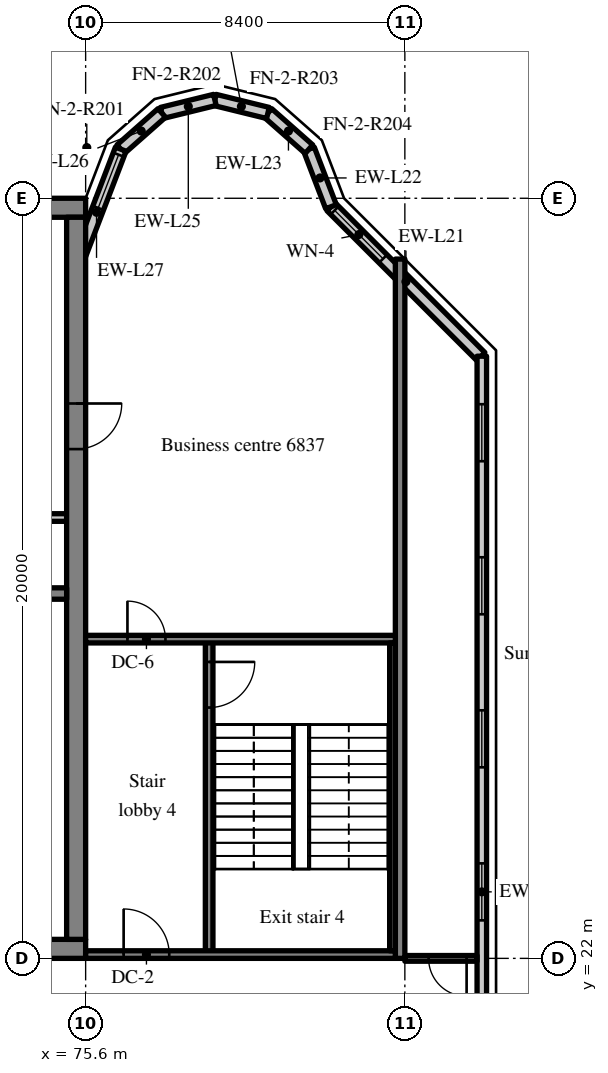
"""IFC4 building model, lengths in metres.
Left out: names, types, materials, properties, quantities, classifications, styles, units other than length and angle.
Written with IfcOpenShell. Run it as: python <this file> out.ifc"""

import sys

from ifc_helpers import new_model, si_unit, direction, frame, frame_2d, origin, place, context, subcontext, project, spatial, rectangle, extrude, source, transform, mapped, element, fill, save


model = new_model("IFC4")
c1 = context("Model", 3, precision=1e-05, world=origin(), true_north=direction((0.0, 1.0)))
c2 = subcontext(c1, "Body", "Model", "MODEL_VIEW")
j1 = project(units=[si_unit("LENGTHUNIT", "METRE"), si_unit("PLANEANGLEUNIT", "RADIAN")], contexts=[c1])
p1 = place(None, origin())
s1 = spatial("IfcSite", under=j1, at=p1, CompositionType="ELEMENT")
p2 = place(p1, origin())
s2 = spatial("IfcBuilding", under=s1, at=p2, CompositionType="ELEMENT")
p3 = place(p2, frame((0.0, 0.0, 285.7)))
s3 = spatial("IfcBuildingStorey", under=s2, at=p3, CompositionType="ELEMENT", Elevation=285.7)
m1 = source(origin(), c2, "Body", "SweptSolid", [
    extrude(rectangle(XDim=50.4, YDim=0.5, at=frame_2d((25.2, 0.0))), origin(), (0.0, 0.0, 1.0), 3.72),
])
p4 = place(p3, frame((25.2, 22.25, 0.0), z_axis=(0.0, 0.0, 1.0), x_axis=(1.0, 0.0, 0.0)))
e1 = element("IfcWall", 1, at=p4, inside=s3, PredefinedType="SHEAR", context=c2, shape_type="MappedRepresentation", body=[
    mapped(m1, transform((0.0, 0.0, 0.0), scale=1.0)),
])
m2 = source(origin(), c2, "Body", "SweptSolid", [
    extrude(rectangle(XDim=1.8, YDim=2.1, at=frame_2d((0.9, 1.05))), frame((0.0, 0.26, 0.0), z_axis=(0.0, -1.0, 0.0), x_axis=(1.0, 0.0, 0.0)), (0.0, 0.0, 1.0), 0.52),
])
p5 = place(p4, frame((15.9, 0.0, 0.0)))
e2 = element("IfcOpeningElement", 2, at=p5, cuts=e1, PredefinedType="OPENING", context=c2, shape_type="MappedRepresentation", body=[
    mapped(m2, transform((0.0, 0.0, 0.0), scale=1.0)),
])
m3 = source(origin(), c2, "Body", "SweptSolid", [
    extrude(rectangle(XDim=0.9, YDim=2.1, at=frame_2d((0.45, 1.05))), frame((0.0, 0.26, 0.0), z_axis=(0.0, -1.0, 0.0), x_axis=(1.0, 0.0, 0.0)), (0.0, 0.0, 1.0), 0.52),
])
p6 = place(p4, frame((21.525, 0.0, 0.0)))
e3 = element("IfcOpeningElement", 3, at=p6, cuts=e1, PredefinedType="OPENING", context=c2, shape_type="MappedRepresentation", body=[
    mapped(m3, transform((0.0, 0.0, 0.0), scale=1.0)),
])
p7 = place(p4, frame((32.7, 0.0, 0.0)))
e4 = element("IfcOpeningElement", 4, at=p7, cuts=e1, PredefinedType="OPENING", context=c2, shape_type="MappedRepresentation", body=[
    mapped(m2, transform((0.0, 0.0, 0.0), scale=1.0)),
])
m4 = source(origin(), c2, "Body", "SweptSolid", [
    extrude(rectangle(XDim=1.2, YDim=2.1, at=frame_2d((0.6, 1.05))), frame((0.0, 0.26, 0.0), z_axis=(0.0, -1.0, 0.0), x_axis=(1.0, 0.0, 0.0)), (0.0, 0.0, 1.0), 0.52),
])
p8 = place(p4, frame((6.5, 0.0, 0.0)))
e5 = element("IfcOpeningElement", 5, at=p8, cuts=e1, PredefinedType="OPENING", context=c2, shape_type="MappedRepresentation", body=[
    mapped(m4, transform((0.0, 0.0, 0.0), scale=1.0)),
])
p9 = place(p4, frame((47.975, 0.0, 0.0)))
e6 = element("IfcOpeningElement", 6, at=p9, cuts=e1, PredefinedType="OPENING", context=c2, shape_type="MappedRepresentation", body=[
    mapped(m4, transform((0.0, 0.0, 0.0), scale=1.0)),
])
p10 = place(p3, frame((25.2, 41.75, 0.0), z_axis=(0.0, 0.0, 1.0), x_axis=(1.0, 0.0, 0.0)))
e7 = element("IfcWall", 7, at=p10, inside=s3, PredefinedType="SHEAR", context=c2, shape_type="MappedRepresentation", body=[
    mapped(m1, transform((0.0, 0.0, 0.0), scale=1.0)),
])
m5 = source(origin(), c2, "Body", "SweptSolid", [
    extrude(rectangle(XDim=19.0, YDim=0.5, at=frame_2d((9.5, 0.0))), origin(), (0.0, 0.0, 1.0), 3.72),
])
p11 = place(p3, frame((75.35, 22.5, 0.0), z_axis=(0.0, 0.0, 1.0), x_axis=(0.0, 1.0, 0.0)))
e8 = element("IfcWall", 8, at=p11, inside=s3, PredefinedType="SHEAR", context=c2, shape_type="MappedRepresentation", body=[
    mapped(m5, transform((0.0, 0.0, 0.0), scale=1.0)),
])
p12 = place(p11, frame((12.9, 0.0, 0.0)))
e9 = element("IfcOpeningElement", 9, at=p12, cuts=e8, PredefinedType="OPENING", context=c2, shape_type="MappedRepresentation", body=[
    mapped(m4, transform((0.0, 0.0, 0.0), scale=1.0)),
])
m6 = source(origin(), c2, "Body", "SweptSolid", [
    extrude(rectangle(XDim=7.75, YDim=0.3, at=frame_2d((3.875, 0.0))), origin(), (0.0, 0.0, 1.0), 3.72),
])
p13 = place(p3, frame((67.35, 31.6, 0.0), z_axis=(0.0, 0.0, 1.0), x_axis=(1.0, 0.0, 0.0)))
e10 = element("IfcWall", 10, at=p13, inside=s3, PredefinedType="SHEAR", context=c2, shape_type="MappedRepresentation", body=[
    mapped(m6, transform((0.0, 0.0, 0.0), scale=1.0)),
])
m7 = source(origin(), c2, "Body", "SweptSolid", [
    extrude(rectangle(XDim=1.1, YDim=2.1, at=frame_2d((0.55, 1.05))), frame((0.0, 0.16, 0.0), z_axis=(0.0, -1.0, 0.0), x_axis=(1.0, 0.0, 0.0)), (0.0, 0.0, 1.0), 0.32),
])
p14 = place(p13, frame((5.875, 0.0, 0.0)))
e11 = element("IfcOpeningElement", 11, at=p14, cuts=e10, PredefinedType="OPENING", context=c2, shape_type="MappedRepresentation", body=[
    mapped(m7, transform((0.0, 0.0, 0.0), scale=1.0)),
])
m8 = source(origin(), c2, "Body", "SweptSolid", [
    extrude(rectangle(XDim=18.4, YDim=0.25, at=frame_2d((9.2, 0.0))), origin(), (0.0, 0.0, 1.0), 3.72),
])
p15 = place(p3, frame((83.875, 22.0, 0.0), z_axis=(0.0, 0.0, 1.0), x_axis=(0.0, 1.0, 0.0)))
e12 = element("IfcWall", 12, at=p15, inside=s3, PredefinedType="SHEAR", context=c2, shape_type="MappedRepresentation", body=[
    mapped(m8, transform((0.0, 0.0, 0.0), scale=1.0)),
])
m9 = source(origin(), c2, "Body", "SweptSolid", [
    extrude(rectangle(XDim=5.576, YDim=0.3, at=frame_2d((2.788, 0.0))), origin(), (0.0, 0.0, 1.0), 3.72),
])
p16 = place(p3, frame((86.0, 37.834, 0.0), z_axis=(0.0, 0.0, 1.0), x_axis=(-0.707106781187, 0.707106781187, 0.0)))
e13 = element("IfcWall", 13, at=p16, inside=s3, PredefinedType="SOLIDWALL", context=c2, shape_type="MappedRepresentation", body=[
    mapped(m9, transform((0.0, 0.0, 0.0), scale=1.0)),
])
m10 = source(origin(), c2, "Body", "SweptSolid", [
    extrude(rectangle(XDim=1.8, YDim=1.5, at=frame_2d((0.9, 0.75))), frame((0.0, 0.16, 0.0), z_axis=(0.0, -1.0, 0.0), x_axis=(1.0, 0.0, 0.0)), (0.0, 0.0, 1.0), 0.32),
])
p17 = place(p16, frame((3.641, 0.0, 0.9)))
e14 = element("IfcOpeningElement", 14, at=p17, cuts=e13, PredefinedType="OPENING", context=c2, shape_type="MappedRepresentation", body=[
    mapped(m10, transform((0.0, 0.0, 0.0), scale=1.0)),
])
m11 = source(origin(), c2, "Body", "SweptSolid", [
    extrude(rectangle(XDim=1.622, YDim=0.3, at=frame_2d((0.811, 0.0))), origin(), (0.0, 0.0, 1.0), 3.72),
])
p18 = place(p3, frame((82.057, 41.777, 0.0), z_axis=(0.0, 0.0, 1.0), x_axis=(-0.357778527068, 0.933806471154, 0.0)))
e15 = element("IfcWall", 15, at=p18, inside=s3, PredefinedType="SOLIDWALL", context=c2, shape_type="MappedRepresentation", body=[
    mapped(m11, transform((0.0, 0.0, 0.0), scale=1.0)),
])
m12 = source(origin(), c2, "Body", "SweptSolid", [
    extrude(rectangle(XDim=1.44, YDim=0.3, at=frame_2d((0.72, 0.0))), origin(), (0.0, 0.0, 1.0), 3.72),
])
p19 = place(p3, frame((81.477, 43.292, 0.0), z_axis=(0.0, 0.0, 1.0), x_axis=(-0.74957555648, 0.661918790432, 0.0)))
e16 = element("IfcWall", 16, at=p19, inside=s3, PredefinedType="SOLIDWALL", context=c2, shape_type="MappedRepresentation", body=[
    mapped(m12, transform((0.0, 0.0, 0.0), scale=1.0)),
])
m13 = source(origin(), c2, "Body", "SweptSolid", [
    extrude(rectangle(XDim=1.439, YDim=0.3, at=frame_2d((0.719, 0.0))), origin(), (0.0, 0.0, 1.0), 3.72),
])
for number, where, z_axis, x_axis in (
    (17, (80.397, 44.245, 0.0), (0.0, 0.0, 1.0), (-0.971, 0.238, 0.0)),
    (18, (79.0, 44.588, 0.0), (0.0, 0.0, 1.0), (-0.971, -0.238, 0.0)),
):
    element("IfcWall", number, at=place(p3, frame(where, z_axis=z_axis, x_axis=x_axis)), inside=s3, PredefinedType="SOLIDWALL", context=c2, shape_type="MappedRepresentation", body=[
        mapped(m13, transform((0.0, 0.0, 0.0), scale=1.0)),
    ])
p20 = place(p3, frame((77.603, 44.245, 0.0), z_axis=(0.0, 0.0, 1.0), x_axis=(-0.74957555648, -0.661918790432, 0.0)))
e19 = element("IfcWall", 19, at=p20, inside=s3, PredefinedType="SOLIDWALL", context=c2, shape_type="MappedRepresentation", body=[
    mapped(m12, transform((0.0, 0.0, 0.0), scale=1.0)),
])
m14 = source(origin(), c2, "Body", "SweptSolid", [
    extrude(rectangle(XDim=3.559, YDim=0.3, at=frame_2d((1.78, 0.0))), origin(), (0.0, 0.0, 1.0), 3.72),
])
p21 = place(p3, frame((76.523, 43.292, 0.0), z_axis=(0.0, 0.0, 1.0), x_axis=(-0.35779745313, -0.933799219604, 0.0)))
e20 = element("IfcWall", 20, at=p21, inside=s3, PredefinedType="SOLIDWALL", context=c2, shape_type="MappedRepresentation", body=[
    mapped(m14, transform((0.0, 0.0, 0.0), scale=1.0)),
])
m15 = source(origin(), c2, "Body", "SweptSolid", [
    extrude(rectangle(XDim=1.5, YDim=2.0, at=frame_2d((0.75, 1.0))), frame((0.0, 0.16, 0.0), z_axis=(0.0, -1.0, 0.0), x_axis=(1.0, 0.0, 0.0)), (0.0, 0.0, 1.0), 0.32),
])
p22 = place(p21, frame((0.156, 0.0, 0.9)))
e21 = element("IfcOpeningElement", 21, at=p22, cuts=e20, PredefinedType="OPENING", context=c2, shape_type="MappedRepresentation", body=[
    mapped(m15, transform((0.0, 0.0, 0.0), scale=1.0)),
])
m16 = source(origin(), c2, "Body", "SweptSolid", [
    extrude(rectangle(XDim=28.189, YDim=0.25, at=frame_2d((14.095, 0.0))), origin(), (0.0, 0.0, 1.0), 3.72),
])
p23 = place(p3, frame((86.025, 9.655, 0.0), z_axis=(0.0, 0.0, 1.0), x_axis=(0.0, 1.0, 0.0)))
e22 = element("IfcWall", 22, at=p23, inside=s3, PredefinedType="SOLIDWALL", context=c2, shape_type="MappedRepresentation", body=[
    mapped(m16, transform((0.0, 0.0, 0.0), scale=1.0)),
])
m17 = source(origin(), c2, "Body", "SweptSolid", [
    extrude(rectangle(XDim=1.5, YDim=1.5, at=frame_2d((0.75, 0.75))), frame((0.0, 0.135, 0.0), z_axis=(0.0, -1.0, 0.0), x_axis=(1.0, 0.0, 0.0)), (0.0, 0.0, 1.0), 0.27),
])
p24 = place(p23, frame((1.263, 0.0, 0.9)))
e23 = element("IfcOpeningElement", 23, at=p24, cuts=e22, PredefinedType="OPENING", context=c2, shape_type="MappedRepresentation", body=[
    mapped(m17, transform((0.0, 0.0, 0.0), scale=1.0)),
])
p25 = place(p23, frame((5.291, 0.0, 0.9)))
e24 = element("IfcOpeningElement", 24, at=p25, cuts=e22, PredefinedType="OPENING", context=c2, shape_type="MappedRepresentation", body=[
    mapped(m17, transform((0.0, 0.0, 0.0), scale=1.0)),
])
p26 = place(p23, frame((9.318, 0.0, 0.9)))
e25 = element("IfcOpeningElement", 25, at=p26, cuts=e22, PredefinedType="OPENING", context=c2, shape_type="MappedRepresentation", body=[
    mapped(m17, transform((0.0, 0.0, 0.0), scale=1.0)),
])
p27 = place(p23, frame((13.345, 0.0, 0.9)))
e26 = element("IfcOpeningElement", 26, at=p27, cuts=e22, PredefinedType="OPENING", context=c2, shape_type="MappedRepresentation", body=[
    mapped(m17, transform((0.0, 0.0, 0.0), scale=1.0)),
])
p28 = place(p23, frame((17.372, 0.0, 0.9)))
e27 = element("IfcOpeningElement", 27, at=p28, cuts=e22, PredefinedType="OPENING", context=c2, shape_type="MappedRepresentation", body=[
    mapped(m17, transform((0.0, 0.0, 0.0), scale=1.0)),
])
p29 = place(p23, frame((21.399, 0.0, 0.9)))
e28 = element("IfcOpeningElement", 28, at=p29, cuts=e22, PredefinedType="OPENING", context=c2, shape_type="MappedRepresentation", body=[
    mapped(m17, transform((0.0, 0.0, 0.0), scale=1.0)),
])
p30 = place(p23, frame((25.426, 0.0, 0.9)))
e29 = element("IfcOpeningElement", 29, at=p30, cuts=e22, PredefinedType="OPENING", context=c2, shape_type="MappedRepresentation", body=[
    mapped(m17, transform((0.0, 0.0, 0.0), scale=1.0)),
])
m18 = source(origin(), c2, "Body", "SweptSolid", [
    extrude(rectangle(XDim=2.65, YDim=0.2, at=frame_2d((1.325, 0.0))), origin(), (0.0, 0.0, 1.0), 3.72),
])
p31 = place(p3, frame((72.45, 33.6, 0.0), z_axis=(0.0, 0.0, 1.0), x_axis=(1.0, 0.0, 0.0)))
e30 = element("IfcWall", 30, at=p31, inside=s3, PredefinedType="SOLIDWALL", context=c2, shape_type="MappedRepresentation", body=[
    mapped(m18, transform((0.0, 0.0, 0.0), scale=1.0)),
])
m19 = source(origin(), c2, "Body", "SweptSolid", [
    extrude(rectangle(XDim=8.3, YDim=0.2, at=frame_2d((4.15, 0.0))), origin(), (0.0, 0.0, 1.0), 3.72),
])
p32 = place(p3, frame((78.85, 22.1, 0.0), z_axis=(0.0, 0.0, 1.0), x_axis=(0.0, 1.0, 0.0)))
e31 = element("IfcWall", 31, at=p32, inside=s3, PredefinedType="SOLIDWALL", context=c2, shape_type="MappedRepresentation", body=[
    mapped(m19, transform((0.0, 0.0, 0.0), scale=1.0)),
])
m20 = source(origin(), c2, "Body", "SweptSolid", [
    extrude(rectangle(XDim=1.2, YDim=2.1, at=frame_2d((0.6, 1.05))), frame((0.0, 0.11, 0.0), z_axis=(0.0, -1.0, 0.0), x_axis=(1.0, 0.0, 0.0)), (0.0, 0.0, 1.0), 0.22),
])
p33 = place(p32, frame((6.5, 0.0, 0.0)))
e32 = element("IfcOpeningElement", 32, at=p33, cuts=e31, PredefinedType="OPENING", context=c2, shape_type="MappedRepresentation", body=[
    mapped(m20, transform((0.0, 0.0, 0.0), scale=1.0)),
])
m21 = source(origin(), c2, "Body", "SweptSolid", [
    extrude(rectangle(XDim=8.15, YDim=0.2, at=frame_2d((4.075, 0.0))), origin(), (0.0, 0.0, 1.0), 3.72),
])
p34 = place(p3, frame((83.75, 22.1, 0.0), z_axis=(0.0, 0.0, 1.0), x_axis=(-1.0, 0.0, 0.0)))
e33 = element("IfcWall", 33, at=p34, inside=s3, PredefinedType="SOLIDWALL", context=c2, shape_type="MappedRepresentation", body=[
    mapped(m21, transform((0.0, 0.0, 0.0), scale=1.0)),
])
p35 = place(p34, frame((5.95, 0.0, 0.0)))
e34 = element("IfcOpeningElement", 34, at=p35, cuts=e33, PredefinedType="OPENING", context=c2, shape_type="MappedRepresentation", body=[
    mapped(m20, transform((0.0, 0.0, 0.0), scale=1.0)),
])
p36 = place(p3, frame((83.75, 30.4, 0.0), z_axis=(0.0, 0.0, 1.0), x_axis=(-1.0, 0.0, 0.0)))
e35 = element("IfcWall", 35, at=p36, inside=s3, PredefinedType="SOLIDWALL", context=c2, shape_type="MappedRepresentation", body=[
    mapped(m21, transform((0.0, 0.0, 0.0), scale=1.0)),
])
m22 = source(origin(), c2, "Body", "SweptSolid", [
    extrude(rectangle(XDim=1.0, YDim=2.1, at=frame_2d((0.5, 1.05))), frame((0.0, 0.11, 0.0), z_axis=(0.0, -1.0, 0.0), x_axis=(1.0, 0.0, 0.0)), (0.0, 0.0, 1.0), 0.22),
])
p37 = place(p36, frame((6.05, 0.0, 0.0)))
e36 = element("IfcOpeningElement", 36, at=p37, cuts=e35, PredefinedType="OPENING", context=c2, shape_type="MappedRepresentation", body=[
    mapped(m22, transform((0.0, 0.0, 0.0), scale=1.0)),
])
m23 = source(origin(), c2, "Body", "SweptSolid", [
    extrude(rectangle(XDim=8.1, YDim=0.15, at=frame_2d((4.05, 0.0))), origin(), (0.0, 0.0, 1.0), 3.72),
])
p38 = place(p3, frame((83.675, 22.2, 0.0), z_axis=(0.0, 0.0, 1.0), x_axis=(0.0, 1.0, 0.0)))
e37 = element("IfcWall", 37, at=p38, inside=s3, PredefinedType="SOLIDWALL", context=c2, shape_type="MappedRepresentation", body=[
    mapped(m23, transform((0.0, 0.0, 0.0), scale=1.0)),
])
m24 = source(origin(), c2, "Body", "SweptSolid", [
    extrude(rectangle(XDim=1.9, YDim=0.15, at=frame_2d((0.95, 0.0))), origin(), (0.0, 0.0, 1.0), 3.02),
])
p39 = place(p3, frame((84.0, 22.0, 0.0), z_axis=(0.0, 0.0, 1.0), x_axis=(1.0, 0.0, 0.0)))
e38 = element("IfcWall", 38, at=p39, inside=s3, PredefinedType="PARTITIONING", context=c2, shape_type="MappedRepresentation", body=[
    mapped(m24, transform((0.0, 0.0, 0.0), scale=1.0)),
])
m25 = source(origin(), c2, "Body", "SweptSolid", [
    extrude(rectangle(XDim=1.0, YDim=2.1, at=frame_2d((0.5, 1.05))), frame((0.0, 0.085, 0.0), z_axis=(0.0, -1.0, 0.0), x_axis=(1.0, 0.0, 0.0)), (0.0, 0.0, 1.0), 0.17),
])
p40 = place(p39, frame((0.625, 0.0, 0.0)))
e39 = element("IfcOpeningElement", 39, at=p40, cuts=e38, PredefinedType="OPENING", context=c2, shape_type="MappedRepresentation", body=[
    mapped(m25, transform((0.0, 0.0, 0.0), scale=1.0)),
])
m26 = source(origin(), c2, "Body", "SweptSolid", [
    extrude(rectangle(XDim=1.8, YDim=1.5, at=frame_2d((0.9, 0.75))), frame((0.0, 0.03, 0.0), z_axis=(0.0, -1.0, 0.0), x_axis=(1.0, 0.0, 0.0)), (0.0, 0.0, 1.0), 0.06),
])
p41 = place(p17, origin())
e40 = element("IfcWindow", 40, at=p41, inside=s3, PartitioningType="SINGLE_PANEL", PredefinedType="WINDOW", context=c2, shape_type="MappedRepresentation", body=[
    mapped(m26, transform((0.0, 0.0, 0.0), scale=1.0)),
])
fill(e14, e40)
m27 = source(origin(), c2, "Body", "SweptSolid", [
    extrude(rectangle(XDim=1.5, YDim=2.0, at=frame_2d((0.75, 1.0))), frame((0.0, 0.03, 0.0), z_axis=(0.0, -1.0, 0.0), x_axis=(1.0, 0.0, 0.0)), (0.0, 0.0, 1.0), 0.06),
])
p42 = place(p22, origin())
e41 = element("IfcWindow", 41, at=p42, inside=s3, PartitioningType="SINGLE_PANEL", PredefinedType="WINDOW", context=c2, shape_type="MappedRepresentation", body=[
    mapped(m27, transform((0.0, 0.0, 0.0), scale=1.0)),
])
fill(e21, e41)
m28 = source(origin(), c2, "Body", "SweptSolid", [
    extrude(rectangle(XDim=1.5, YDim=1.5, at=frame_2d((0.75, 0.75))), frame((0.0, 0.03, 0.0), z_axis=(0.0, -1.0, 0.0), x_axis=(1.0, 0.0, 0.0)), (0.0, 0.0, 1.0), 0.06),
])
p43 = place(p27, origin())
e42 = element("IfcWindow", 42, at=p43, inside=s3, PartitioningType="SINGLE_PANEL", PredefinedType="WINDOW", context=c2, shape_type="MappedRepresentation", body=[
    mapped(m28, transform((0.0, 0.0, 0.0), scale=1.0)),
])
fill(e26, e42)
p44 = place(p28, origin())
e43 = element("IfcWindow", 43, at=p44, inside=s3, PartitioningType="SINGLE_PANEL", PredefinedType="WINDOW", context=c2, shape_type="MappedRepresentation", body=[
    mapped(m28, transform((0.0, 0.0, 0.0), scale=1.0)),
])
fill(e27, e43)
p45 = place(p29, origin())
e44 = element("IfcWindow", 44, at=p45, inside=s3, PartitioningType="SINGLE_PANEL", PredefinedType="WINDOW", context=c2, shape_type="MappedRepresentation", body=[
    mapped(m28, transform((0.0, 0.0, 0.0), scale=1.0)),
])
fill(e28, e44)
p46 = place(p30, origin())
e45 = element("IfcWindow", 45, at=p46, inside=s3, PartitioningType="SINGLE_PANEL", PredefinedType="WINDOW", context=c2, shape_type="MappedRepresentation", body=[
    mapped(m28, transform((0.0, 0.0, 0.0), scale=1.0)),
])
fill(e29, e45)
m29 = source(origin(), c2, "Body", "SweptSolid", [
    extrude(rectangle(XDim=1.2, YDim=2.1, at=frame_2d((0.6, 1.05))), frame((0.0, 0.025, 0.0), z_axis=(0.0, -1.0, 0.0), x_axis=(1.0, 0.0, 0.0)), (0.0, 0.0, 1.0), 0.05),
])
p47 = place(p12, origin())
e46 = element("IfcDoor", 46, at=p47, inside=s3, OperationType="SINGLE_SWING_RIGHT", PredefinedType="DOOR", context=c2, shape_type="MappedRepresentation", body=[
    mapped(m29, transform((0.0, 0.0, 0.0), scale=1.0)),
])
fill(e9, e46)
p48 = place(p33, origin())
e47 = element("IfcDoor", 47, at=p48, inside=s3, OperationType="SINGLE_SWING_RIGHT", PredefinedType="DOOR", context=c2, shape_type="MappedRepresentation", body=[
    mapped(m29, transform((0.0, 0.0, 0.0), scale=1.0)),
])
fill(e32, e47)
p49 = place(p35, origin())
e48 = element("IfcDoor", 48, at=p49, inside=s3, OperationType="SINGLE_SWING_RIGHT", PredefinedType="DOOR", context=c2, shape_type="MappedRepresentation", body=[
    mapped(m29, transform((0.0, 0.0, 0.0), scale=1.0)),
])
fill(e34, e48)
m30 = source(origin(), c2, "Body", "SweptSolid", [
    extrude(rectangle(XDim=1.0, YDim=2.1, at=frame_2d((0.5, 1.05))), frame((0.0, 0.025, 0.0), z_axis=(0.0, -1.0, 0.0), x_axis=(1.0, 0.0, 0.0)), (0.0, 0.0, 1.0), 0.05),
])
p50 = place(p37, origin())
e49 = element("IfcDoor", 49, at=p50, inside=s3, OperationType="SINGLE_SWING_RIGHT", PredefinedType="DOOR", context=c2, shape_type="MappedRepresentation", body=[
    mapped(m30, transform((0.0, 0.0, 0.0), scale=1.0)),
])
fill(e36, e49)
p51 = place(p40, origin())
e50 = element("IfcDoor", 50, at=p51, inside=s3, OperationType="SINGLE_SWING_RIGHT", PredefinedType="DOOR", context=c2, shape_type="MappedRepresentation", body=[
    mapped(m30, transform((0.0, 0.0, 0.0), scale=1.0)),
])
fill(e39, e50)
save(model, sys.argv[1])
